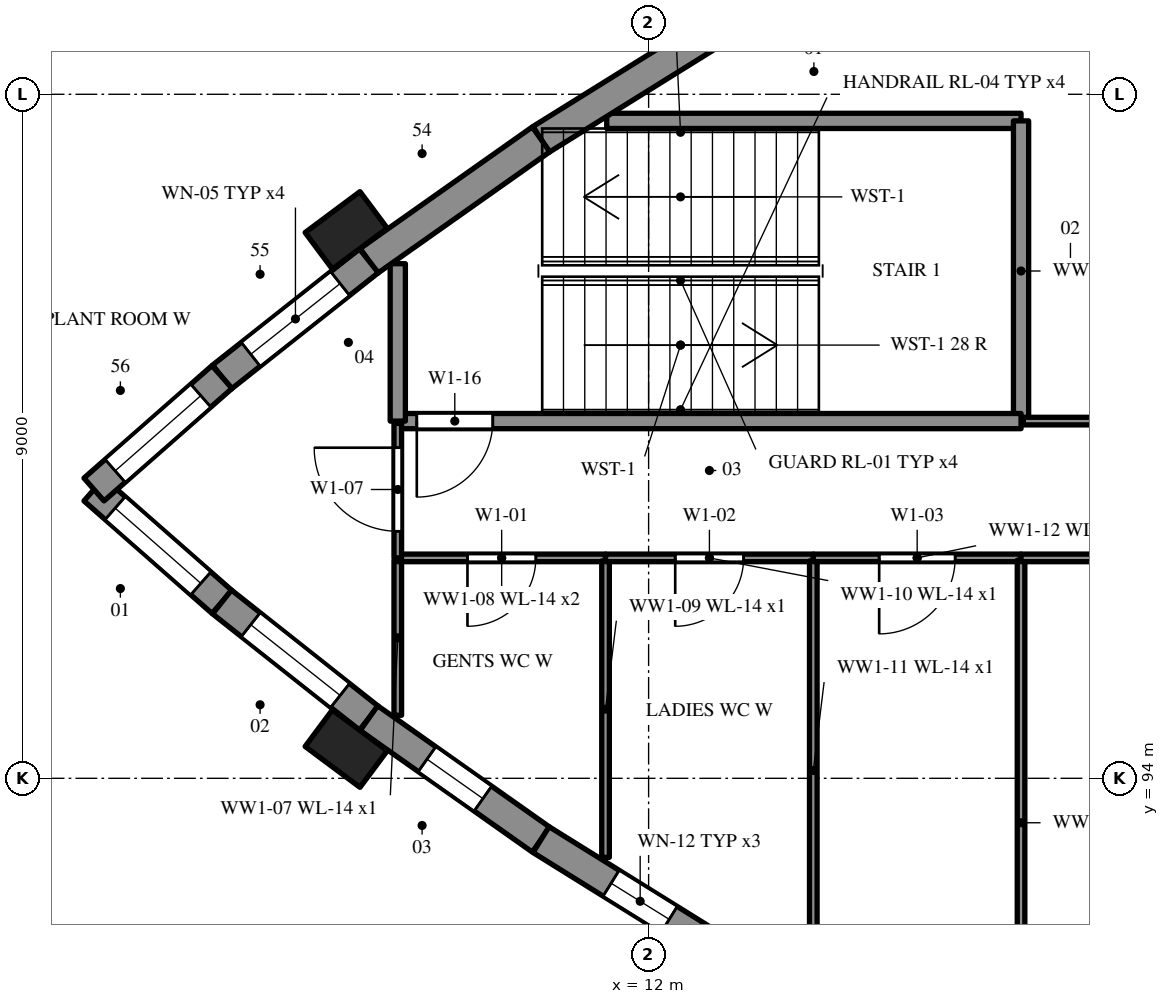
"""IFC4 building model, lengths in metres.
Left out: names, types, materials, properties, quantities, classifications, styles, units other than length and angle.
Written with IfcOpenShell. Run it as: python <this file> out.ifc"""

import sys

from ifc_helpers import new_model, si_unit, direction, frame, frame_2d, origin, origin_2d, place, context, subcontext, project, spatial, rectangle, extrude, element, fill, save


model = new_model("IFC4")
c1 = context("Model", 3, precision=1e-05, world=origin(), true_north=direction((0.0, 1.0)))
c2 = subcontext(c1, "Body", "Model", "MODEL_VIEW")
j1 = project(units=[si_unit("LENGTHUNIT", "METRE"), si_unit("PLANEANGLEUNIT", "RADIAN")], contexts=[c1])
p1 = place(None, origin())
s1 = spatial("IfcSite", under=j1, at=p1, CompositionType="ELEMENT")
p2 = place(p1, origin())
s2 = spatial("IfcBuilding", under=s1, at=p2, CompositionType="ELEMENT")
p3 = place(p2, frame((0.0, 0.0, 5.4)))
s3 = spatial("IfcBuildingStorey", under=s2, at=p3, CompositionType="ELEMENT", Elevation=5.4)
p4 = place(p3, frame((11.449, 102.65, 0.0), z_axis=(0.0, 0.0, 1.0), x_axis=(1.0, 0.0, 0.0)))
e1 = element("IfcWall", 1, at=p4, inside=s3, PredefinedType="SHEAR", context=c2, shape_type="SweptSolid", body=[
    extrude(rectangle(XDim=5.451, YDim=0.2, at=frame_2d((2.726, 0.0))), origin(), (0.0, 0.0, 1.0), 4.8),
])
p5 = place(p3, frame((16.9, 102.65, 0.0), z_axis=(0.0, 0.0, 1.0), x_axis=(0.0, -1.0, 0.0)))
e2 = element("IfcWall", 2, at=p5, inside=s3, PredefinedType="SHEAR", context=c2, shape_type="SweptSolid", body=[
    extrude(rectangle(XDim=3.95, YDim=0.2, at=frame_2d((1.975, 0.0))), origin(), (0.0, 0.0, 1.0), 4.8),
])
p6 = place(p3, frame((16.9, 98.7, 0.0), z_axis=(0.0, 0.0, 1.0), x_axis=(-1.0, 0.0, 0.0)))
e3 = element("IfcWall", 3, at=p6, inside=s3, PredefinedType="SHEAR", context=c2, shape_type="SweptSolid", body=[
    extrude(rectangle(XDim=8.2, YDim=0.2, at=frame_2d((4.1, 0.0))), origin(), (0.0, 0.0, 1.0), 4.8),
])
p7 = place(p6, frame((6.95, 0.0, 0.0)))
e4 = element("IfcOpeningElement", 4, at=p7, cuts=e3, PredefinedType="OPENING", context=c2, shape_type="SweptSolid", body=[
    extrude(rectangle(XDim=1.0, YDim=2.4, at=frame_2d((0.5, 1.2))), frame((0.0, 0.11, 0.0), z_axis=(0.0, -1.0, 0.0), x_axis=(1.0, 0.0, 0.0)), (0.0, 0.0, 1.0), 0.22),
])
p8 = place(p3, frame((8.7, 98.7, 0.0), z_axis=(0.0, 0.0, 1.0), x_axis=(0.0, 1.0, 0.0)))
e5 = element("IfcWall", 5, at=p8, inside=s3, PredefinedType="SHEAR", context=c2, shape_type="SweptSolid", body=[
    extrude(rectangle(XDim=2.071, YDim=0.2, at=frame_2d((1.035, 0.0))), origin(), (0.0, 0.0, 1.0), 4.8),
])
p9 = place(p3, frame((4.703, 97.8, 0.0), z_axis=(0.0, 0.0, 1.0), x_axis=(0.751212351098, -0.660060605973, 0.0)))
e6 = element("IfcWall", 6, at=p9, inside=s3, PredefinedType="SOLIDWALL", context=c2, shape_type="SweptSolid", body=[
    extrude(rectangle(XDim=2.242, YDim=0.4, at=frame_2d((1.121, 0.0))), origin(), (0.0, 0.0, 1.0), 4.8),
])
p10 = place(p9, frame((0.371, 0.0, 2.4)))
e7 = element("IfcOpeningElement", 7, at=p10, cuts=e6, PredefinedType="OPENING", context=c2, shape_type="SweptSolid", body=[
    extrude(rectangle(XDim=1.5, YDim=0.6, at=frame_2d((0.75, 0.3))), frame((0.0, 0.21, 0.0), z_axis=(0.0, -1.0, 0.0), x_axis=(1.0, 0.0, 0.0)), (0.0, 0.0, 1.0), 0.42),
])
p11 = place(p3, frame((6.387, 96.32, 0.0), z_axis=(0.0, 0.0, 1.0), x_axis=(0.784278812541, -0.620408530082, 0.0)))
e8 = element("IfcWall", 8, at=p11, inside=s3, PredefinedType="SOLIDWALL", context=c2, shape_type="SweptSolid", body=[
    extrude(rectangle(XDim=2.464, YDim=0.4, at=frame_2d((1.232, 0.0))), origin(), (0.0, 0.0, 1.0), 4.8),
])
p12 = place(p11, frame((0.482, 0.0, 2.4)))
e9 = element("IfcOpeningElement", 9, at=p12, cuts=e8, PredefinedType="OPENING", context=c2, shape_type="SweptSolid", body=[
    extrude(rectangle(XDim=1.5, YDim=0.6, at=frame_2d((0.75, 0.3))), frame((0.0, 0.21, 0.0), z_axis=(0.0, -1.0, 0.0), x_axis=(1.0, 0.0, 0.0)), (0.0, 0.0, 1.0), 0.42),
])
p13 = place(p3, frame((8.32, 94.792, 0.0), z_axis=(0.0, 0.0, 1.0), x_axis=(0.817028877428, -0.576596751161, 0.0)))
e10 = element("IfcWall", 10, at=p13, inside=s3, PredefinedType="SOLIDWALL", context=c2, shape_type="SweptSolid", body=[
    extrude(rectangle(XDim=2.772, YDim=0.4, at=frame_2d((1.386, 0.0))), origin(), (0.0, 0.0, 1.0), 4.8),
])
p14 = place(p13, frame((0.936, 0.0, 1.6)))
e11 = element("IfcOpeningElement", 11, at=p14, cuts=e10, PredefinedType="OPENING", context=c2, shape_type="SweptSolid", body=[
    extrude(rectangle(XDim=0.9, YDim=0.6, at=frame_2d((0.45, 0.3))), frame((0.0, 0.21, 0.0), z_axis=(0.0, -1.0, 0.0), x_axis=(1.0, 0.0, 0.0)), (0.0, 0.0, 1.0), 0.42),
])
p15 = place(p3, frame((10.585, 93.193, 0.0), z_axis=(0.0, 0.0, 1.0), x_axis=(0.84912946359, -0.528184772653, 0.0)))
e12 = element("IfcWall", 12, at=p15, inside=s3, PredefinedType="SOLIDWALL", context=c2, shape_type="SweptSolid", body=[
    extrude(rectangle(XDim=2.772, YDim=0.4, at=frame_2d((1.386, 0.0))), origin(), (0.0, 0.0, 1.0), 4.8),
])
p16 = place(p15, frame((1.086, 0.0, 1.6)))
e13 = element("IfcOpeningElement", 13, at=p16, cuts=e12, PredefinedType="OPENING", context=c2, shape_type="SweptSolid", body=[
    extrude(rectangle(XDim=0.9, YDim=0.6, at=frame_2d((0.45, 0.3))), frame((0.0, 0.21, 0.0), z_axis=(0.0, -1.0, 0.0), x_axis=(1.0, 0.0, 0.0)), (0.0, 0.0, 1.0), 0.42),
])
for number, where, z_axis, x_axis in (
    (14, (12.938, 103.871, 0.0), (0.0, 0.0, 1.0), (-0.849, -0.528, 0.0)),
    (15, (10.585, 102.407, 0.0), (0.0, 0.0, 1.0), (-0.817, -0.577, 0.0)),
):
    element("IfcWall", number, at=place(p3, frame(where, z_axis=z_axis, x_axis=x_axis)), inside=s3, PredefinedType="SOLIDWALL", context=c2, shape_type="SweptSolid", body=[
        extrude(rectangle(XDim=2.772, YDim=0.4, at=frame_2d((1.386, 0.0))), origin(), (0.0, 0.0, 1.0), 4.8),
    ])
p17 = place(p3, frame((8.32, 100.809, 0.0), z_axis=(0.0, 0.0, 1.0), x_axis=(-0.784278812541, -0.620408530082, 0.0)))
e16 = element("IfcWall", 16, at=p17, inside=s3, PredefinedType="SOLIDWALL", context=c2, shape_type="SweptSolid", body=[
    extrude(rectangle(XDim=2.464, YDim=0.4, at=frame_2d((1.232, 0.0))), origin(), (0.0, 0.0, 1.0), 4.8),
])
p18 = place(p17, frame((0.482, 0.0, 2.4)))
e17 = element("IfcOpeningElement", 17, at=p18, cuts=e16, PredefinedType="OPENING", context=c2, shape_type="SweptSolid", body=[
    extrude(rectangle(XDim=1.5, YDim=0.6, at=frame_2d((0.75, 0.3))), frame((0.0, 0.21, 0.0), z_axis=(0.0, -1.0, 0.0), x_axis=(1.0, 0.0, 0.0)), (0.0, 0.0, 1.0), 0.42),
])
p19 = place(p3, frame((6.387, 99.28, 0.0), z_axis=(0.0, 0.0, 1.0), x_axis=(-0.751212351098, -0.660060605973, 0.0)))
e18 = element("IfcWall", 18, at=p19, inside=s3, PredefinedType="SOLIDWALL", context=c2, shape_type="SweptSolid", body=[
    extrude(rectangle(XDim=2.242, YDim=0.4, at=frame_2d((1.121, 0.0))), origin(), (0.0, 0.0, 1.0), 4.8),
])
p20 = place(p19, frame((0.371, 0.0, 2.4)))
e19 = element("IfcOpeningElement", 19, at=p20, cuts=e18, PredefinedType="OPENING", context=c2, shape_type="SweptSolid", body=[
    extrude(rectangle(XDim=1.5, YDim=0.6, at=frame_2d((0.75, 0.3))), frame((0.0, 0.21, 0.0), z_axis=(0.0, -1.0, 0.0), x_axis=(1.0, 0.0, 0.0)), (0.0, 0.0, 1.0), 0.42),
])
for number, where, z_axis, x_axis in (
    (20, (8.021, 94.391, 0.0), (0.0, 0.0, 1.0), (0.802, -0.597, 0.0)),
    (21, (8.021, 101.209, 0.0), (0.0, 0.0, 1.0), (-0.802, -0.597, 0.0)),
):
    element("IfcColumn", number, at=place(p3, frame(where, z_axis=z_axis, x_axis=x_axis)), inside=s3, PredefinedType="PILASTER", context=c2, shape_type="SweptSolid", body=[
        extrude(rectangle(XDim=0.9, YDim=0.6, at=origin_2d()), origin(), (0.0, 0.0, 1.0), 4.8),
    ])
p21 = place(p3, frame((8.7, 94.829, 0.0), z_axis=(0.0, 0.0, 1.0), x_axis=(0.0, 1.0, 0.0)))
e22 = element("IfcWall", 22, at=p21, inside=s3, PredefinedType="PARTITIONING", context=c2, shape_type="SweptSolid", body=[
    extrude(rectangle(XDim=2.041, YDim=0.1, at=frame_2d((1.021, 0.0))), origin(), (0.0, 0.0, 1.0), 4.52),
])
p22 = place(p3, frame((11.433, 96.9, 0.0), z_axis=(0.0, 0.0, 1.0), x_axis=(-1.0, 0.0, 0.0)))
e23 = element("IfcWall", 23, at=p22, inside=s3, PredefinedType="PARTITIONING", context=c2, shape_type="SweptSolid", body=[
    extrude(rectangle(XDim=2.733, YDim=0.1, at=frame_2d((1.367, 0.0))), origin(), (0.0, 0.0, 1.0), 4.52),
])
p23 = place(p22, frame((0.917, 0.0, 0.0)))
e24 = element("IfcOpeningElement", 24, at=p23, cuts=e23, PredefinedType="OPENING", context=c2, shape_type="SweptSolid", body=[
    extrude(rectangle(XDim=0.9, YDim=2.1, at=frame_2d((0.45, 1.05))), frame((0.0, 0.06, 0.0), z_axis=(0.0, -1.0, 0.0), x_axis=(1.0, 0.0, 0.0)), (0.0, 0.0, 1.0), 0.12),
])
p24 = place(p3, frame((8.7, 96.9, 0.0), z_axis=(0.0, 0.0, 1.0), x_axis=(0.0, 1.0, 0.0)))
e25 = element("IfcWall", 25, at=p24, inside=s3, PredefinedType="PARTITIONING", context=c2, shape_type="SweptSolid", body=[
    extrude(rectangle(XDim=1.77, YDim=0.1, at=frame_2d((0.885, 0.0))), origin(), (0.0, 0.0, 1.0), 4.52),
])
p25 = place(p24, frame((0.35, 0.0, 0.0)))
e26 = element("IfcOpeningElement", 26, at=p25, cuts=e25, PredefinedType="OPENING", context=c2, shape_type="SweptSolid", body=[
    extrude(rectangle(XDim=1.1, YDim=2.1, at=frame_2d((0.55, 1.05))), frame((0.0, 0.06, 0.0), z_axis=(0.0, -1.0, 0.0), x_axis=(1.0, 0.0, 0.0)), (0.0, 0.0, 1.0), 0.12),
])
p26 = place(p3, frame((11.433, 96.86, 0.0), z_axis=(0.0, 0.0, 1.0), x_axis=(0.0, -1.0, 0.0)))
e27 = element("IfcWall", 27, at=p26, inside=s3, PredefinedType="PARTITIONING", context=c2, shape_type="SweptSolid", body=[
    extrude(rectangle(XDim=3.9, YDim=0.1, at=frame_2d((1.95, 0.0))), origin(), (0.0, 0.0, 1.0), 4.52),
])
p27 = place(p3, frame((14.167, 96.9, 0.0), z_axis=(0.0, 0.0, 1.0), x_axis=(-1.0, 0.0, 0.0)))
e28 = element("IfcWall", 28, at=p27, inside=s3, PredefinedType="PARTITIONING", context=c2, shape_type="SweptSolid", body=[
    extrude(rectangle(XDim=2.733, YDim=0.1, at=frame_2d((1.367, 0.0))), origin(), (0.0, 0.0, 1.0), 4.52),
])
p28 = place(p27, frame((0.917, 0.0, 0.0)))
e29 = element("IfcOpeningElement", 29, at=p28, cuts=e28, PredefinedType="OPENING", context=c2, shape_type="SweptSolid", body=[
    extrude(rectangle(XDim=0.9, YDim=2.1, at=frame_2d((0.45, 1.05))), frame((0.0, 0.06, 0.0), z_axis=(0.0, -1.0, 0.0), x_axis=(1.0, 0.0, 0.0)), (0.0, 0.0, 1.0), 0.12),
])
p29 = place(p3, frame((14.167, 96.86, 0.0), z_axis=(0.0, 0.0, 1.0), x_axis=(0.0, -1.0, 0.0)))
e30 = element("IfcWall", 30, at=p29, inside=s3, PredefinedType="PARTITIONING", context=c2, shape_type="SweptSolid", body=[
    extrude(rectangle(XDim=5.515, YDim=0.1, at=frame_2d((2.758, 0.0))), origin(), (0.0, 0.0, 1.0), 4.52),
])
p30 = place(p3, frame((16.9, 96.9, 0.0), z_axis=(0.0, 0.0, 1.0), x_axis=(-1.0, 0.0, 0.0)))
e31 = element("IfcWall", 31, at=p30, inside=s3, PredefinedType="PARTITIONING", context=c2, shape_type="SweptSolid", body=[
    extrude(rectangle(XDim=2.733, YDim=0.1, at=frame_2d((1.367, 0.0))), origin(), (0.0, 0.0, 1.0), 4.52),
])
p31 = place(p30, frame((0.867, 0.0, 0.0)))
e32 = element("IfcOpeningElement", 32, at=p31, cuts=e31, PredefinedType="OPENING", context=c2, shape_type="SweptSolid", body=[
    extrude(rectangle(XDim=1.0, YDim=2.1, at=frame_2d((0.5, 1.05))), frame((0.0, 0.06, 0.0), z_axis=(0.0, -1.0, 0.0), x_axis=(1.0, 0.0, 0.0)), (0.0, 0.0, 1.0), 0.12),
])
p32 = place(p3, frame((16.9, 96.87, 0.0), z_axis=(0.0, 0.0, 1.0), x_axis=(0.0, -1.0, 0.0)))
e33 = element("IfcWall", 33, at=p32, inside=s3, PredefinedType="PARTITIONING", context=c2, shape_type="SweptSolid", body=[
    extrude(rectangle(XDim=6.91, YDim=0.1, at=frame_2d((3.455, 0.0))), origin(), (0.0, 0.0, 1.0), 4.52),
])
p33 = place(p3, frame((36.0, 96.9, 0.0), z_axis=(0.0, 0.0, 1.0), x_axis=(-1.0, 0.0, 0.0)))
e34 = element("IfcWall", 34, at=p33, inside=s3, PredefinedType="PARTITIONING", context=c2, shape_type="SweptSolid", body=[
    extrude(rectangle(XDim=19.1, YDim=0.1, at=frame_2d((9.55, 0.0))), origin(), (0.0, 0.0, 1.0), 4.52),
])
p34 = place(p33, frame((13.775, 0.0, 0.0)))
e35 = element("IfcOpeningElement", 35, at=p34, cuts=e34, PredefinedType="OPENING", context=c2, shape_type="SweptSolid", body=[
    extrude(rectangle(XDim=1.1, YDim=2.1, at=frame_2d((0.55, 1.05))), frame((0.0, 0.06, 0.0), z_axis=(0.0, -1.0, 0.0), x_axis=(1.0, 0.0, 0.0)), (0.0, 0.0, 1.0), 0.12),
])
p35 = place(p33, frame((4.225, 0.0, 0.0)))
e36 = element("IfcOpeningElement", 36, at=p35, cuts=e34, PredefinedType="OPENING", context=c2, shape_type="SweptSolid", body=[
    extrude(rectangle(XDim=1.1, YDim=2.1, at=frame_2d((0.55, 1.05))), frame((0.0, 0.06, 0.0), z_axis=(0.0, -1.0, 0.0), x_axis=(1.0, 0.0, 0.0)), (0.0, 0.0, 1.0), 0.12),
])
p36 = place(p3, frame((16.93, 98.7, 0.0), z_axis=(0.0, 0.0, 1.0), x_axis=(1.0, 0.0, 0.0)))
e37 = element("IfcWall", 37, at=p36, inside=s3, PredefinedType="PARTITIONING", context=c2, shape_type="SweptSolid", body=[
    extrude(rectangle(XDim=21.895, YDim=0.1, at=frame_2d((10.948, 0.0))), origin(), (0.0, 0.0, 1.0), 4.52),
])
p37 = place(p36, frame((19.445, 0.0, 0.0)))
e38 = element("IfcOpeningElement", 38, at=p37, cuts=e37, PredefinedType="OPENING", context=c2, shape_type="SweptSolid", body=[
    extrude(rectangle(XDim=1.8, YDim=2.1, at=frame_2d((0.9, 1.05))), frame((0.0, 0.06, 0.0), z_axis=(0.0, -1.0, 0.0), x_axis=(1.0, 0.0, 0.0)), (0.0, 0.0, 1.0), 0.12),
])
p38 = place(p36, frame((6.095, 0.0, 0.0)))
e39 = element("IfcOpeningElement", 39, at=p38, cuts=e37, PredefinedType="OPENING", context=c2, shape_type="SweptSolid", body=[
    extrude(rectangle(XDim=1.8, YDim=2.1, at=frame_2d((0.9, 1.05))), frame((0.0, 0.06, 0.0), z_axis=(0.0, -1.0, 0.0), x_axis=(1.0, 0.0, 0.0)), (0.0, 0.0, 1.0), 0.12),
])
p39 = place(p10, origin())
e40 = element("IfcWindow", 40, at=p39, inside=s3, PartitioningType="SINGLE_PANEL", PredefinedType="WINDOW", context=c2, shape_type="SweptSolid", body=[
    extrude(rectangle(XDim=1.5, YDim=0.6, at=frame_2d((0.75, 0.3))), frame((0.0, 0.03, 0.0), z_axis=(0.0, -1.0, 0.0), x_axis=(1.0, 0.0, 0.0)), (0.0, 0.0, 1.0), 0.06),
])
fill(e7, e40)
p40 = place(p12, origin())
e41 = element("IfcWindow", 41, at=p40, inside=s3, PartitioningType="SINGLE_PANEL", PredefinedType="WINDOW", context=c2, shape_type="SweptSolid", body=[
    extrude(rectangle(XDim=1.5, YDim=0.6, at=frame_2d((0.75, 0.3))), frame((0.0, 0.03, 0.0), z_axis=(0.0, -1.0, 0.0), x_axis=(1.0, 0.0, 0.0)), (0.0, 0.0, 1.0), 0.06),
])
fill(e9, e41)
p41 = place(p14, origin())
e42 = element("IfcWindow", 42, at=p41, inside=s3, PartitioningType="SINGLE_PANEL", PredefinedType="WINDOW", context=c2, shape_type="SweptSolid", body=[
    extrude(rectangle(XDim=0.9, YDim=0.6, at=frame_2d((0.45, 0.3))), frame((0.0, 0.03, 0.0), z_axis=(0.0, -1.0, 0.0), x_axis=(1.0, 0.0, 0.0)), (0.0, 0.0, 1.0), 0.06),
])
fill(e11, e42)
p42 = place(p16, origin())
e43 = element("IfcWindow", 43, at=p42, inside=s3, PartitioningType="SINGLE_PANEL", PredefinedType="WINDOW", context=c2, shape_type="SweptSolid", body=[
    extrude(rectangle(XDim=0.9, YDim=0.6, at=frame_2d((0.45, 0.3))), frame((0.0, 0.03, 0.0), z_axis=(0.0, -1.0, 0.0), x_axis=(1.0, 0.0, 0.0)), (0.0, 0.0, 1.0), 0.06),
])
fill(e13, e43)
p43 = place(p18, origin())
e44 = element("IfcWindow", 44, at=p43, inside=s3, PartitioningType="SINGLE_PANEL", PredefinedType="WINDOW", context=c2, shape_type="SweptSolid", body=[
    extrude(rectangle(XDim=1.5, YDim=0.6, at=frame_2d((0.75, 0.3))), frame((0.0, 0.03, 0.0), z_axis=(0.0, -1.0, 0.0), x_axis=(1.0, 0.0, 0.0)), (0.0, 0.0, 1.0), 0.06),
])
fill(e17, e44)
p44 = place(p20, origin())
e45 = element("IfcWindow", 45, at=p44, inside=s3, PartitioningType="SINGLE_PANEL", PredefinedType="WINDOW", context=c2, shape_type="SweptSolid", body=[
    extrude(rectangle(XDim=1.5, YDim=0.6, at=frame_2d((0.75, 0.3))), frame((0.0, 0.03, 0.0), z_axis=(0.0, -1.0, 0.0), x_axis=(1.0, 0.0, 0.0)), (0.0, 0.0, 1.0), 0.06),
])
fill(e19, e45)
p45 = place(p23, origin())
e46 = element("IfcDoor", 46, at=p45, inside=s3, OperationType="SINGLE_SWING_RIGHT", PredefinedType="DOOR", context=c2, shape_type="SweptSolid", body=[
    extrude(rectangle(XDim=0.9, YDim=2.1, at=frame_2d((0.45, 1.05))), frame((0.0, 0.025, 0.0), z_axis=(0.0, -1.0, 0.0), x_axis=(1.0, 0.0, 0.0)), (0.0, 0.0, 1.0), 0.05),
])
fill(e24, e46)
p46 = place(p28, origin())
e47 = element("IfcDoor", 47, at=p46, inside=s3, OperationType="SINGLE_SWING_RIGHT", PredefinedType="DOOR", context=c2, shape_type="SweptSolid", body=[
    extrude(rectangle(XDim=0.9, YDim=2.1, at=frame_2d((0.45, 1.05))), frame((0.0, 0.025, 0.0), z_axis=(0.0, -1.0, 0.0), x_axis=(1.0, 0.0, 0.0)), (0.0, 0.0, 1.0), 0.05),
])
fill(e29, e47)
p47 = place(p31, origin())
e48 = element("IfcDoor", 48, at=p47, inside=s3, OperationType="SINGLE_SWING_RIGHT", PredefinedType="DOOR", context=c2, shape_type="SweptSolid", body=[
    extrude(rectangle(XDim=1.0, YDim=2.1, at=frame_2d((0.5, 1.05))), frame((0.0, 0.025, 0.0), z_axis=(0.0, -1.0, 0.0), x_axis=(1.0, 0.0, 0.0)), (0.0, 0.0, 1.0), 0.05),
])
fill(e32, e48)
p48 = place(p25, origin())
e49 = element("IfcDoor", 49, at=p48, inside=s3, OperationType="SINGLE_SWING_RIGHT", PredefinedType="DOOR", context=c2, shape_type="SweptSolid", body=[
    extrude(rectangle(XDim=1.1, YDim=2.1, at=frame_2d((0.55, 1.05))), frame((0.0, 0.025, 0.0), z_axis=(0.0, -1.0, 0.0), x_axis=(1.0, 0.0, 0.0)), (0.0, 0.0, 1.0), 0.05),
])
fill(e26, e49)
p49 = place(p7, origin())
e50 = element("IfcDoor", 50, at=p49, inside=s3, OperationType="SINGLE_SWING_RIGHT", PredefinedType="DOOR", context=c2, shape_type="SweptSolid", body=[
    extrude(rectangle(XDim=1.0, YDim=2.4, at=frame_2d((0.5, 1.2))), frame((0.0, 0.025, 0.0), z_axis=(0.0, -1.0, 0.0), x_axis=(1.0, 0.0, 0.0)), (0.0, 0.0, 1.0), 0.05),
])
fill(e4, e50)
save(model, sys.argv[1])
